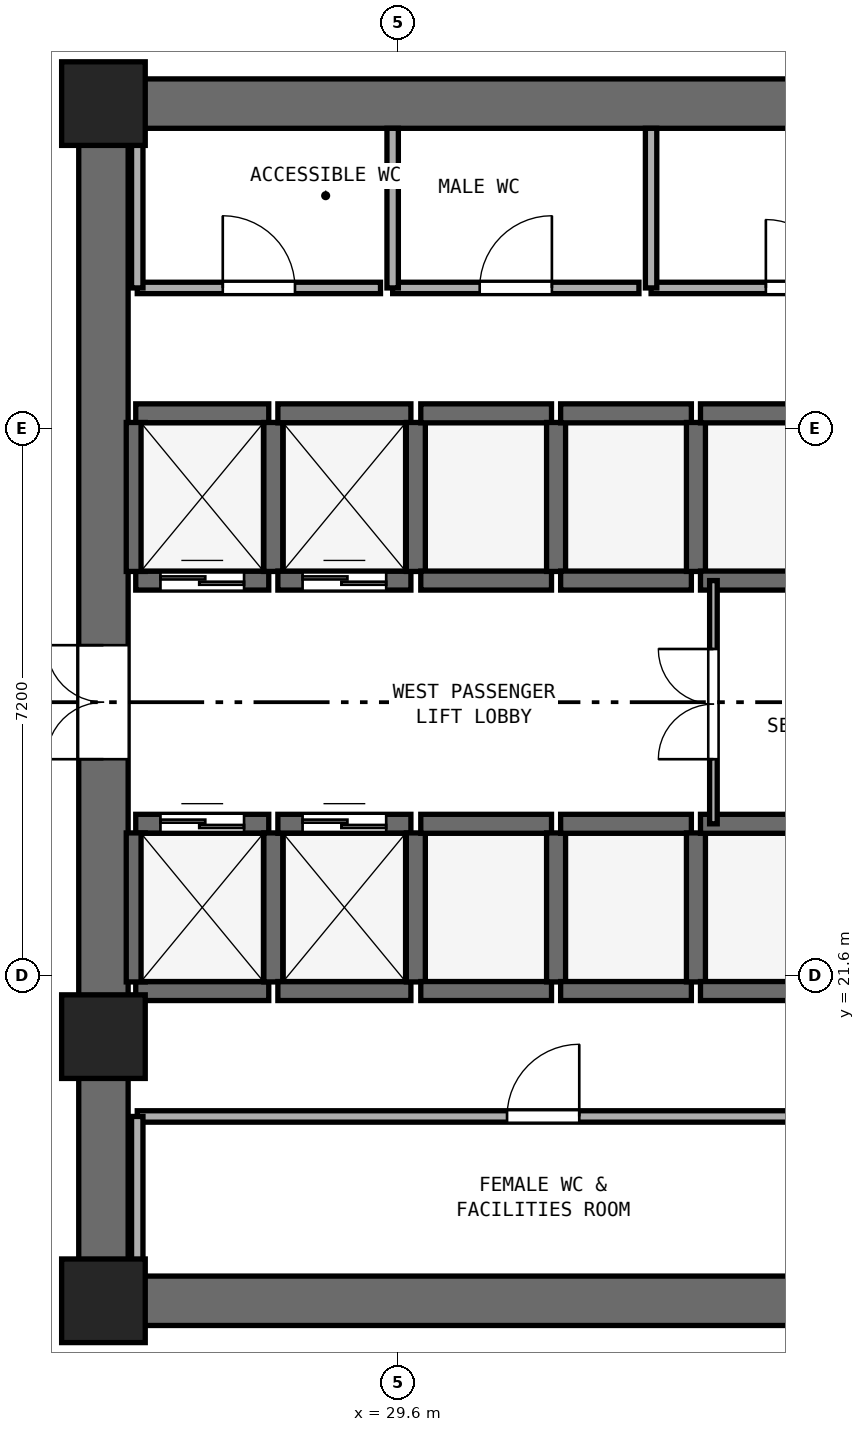
"""IFC4 building model, lengths in metres.
Left out: names, types, materials, properties, quantities, classifications, styles, units other than length and angle.
Written with IfcOpenShell. Run it as: python <this file> out.ifc"""

import sys

from ifc_helpers import new_model, si_unit, direction, frame, frame_2d, origin, origin_2d, place, context, subcontext, project, spatial, rectangle, extrude, element, fill, save


model = new_model("IFC4")
c1 = context("Model", 3, precision=1e-05, world=origin(), true_north=direction((0.0, 1.0)))
c2 = subcontext(c1, "Body", "Model", "MODEL_VIEW")
j1 = project(units=[si_unit("LENGTHUNIT", "METRE"), si_unit("PLANEANGLEUNIT", "RADIAN")], contexts=[c1])
p1 = place(None, origin())
s1 = spatial("IfcSite", under=j1, at=p1, CompositionType="ELEMENT")
p2 = place(p1, origin())
s2 = spatial("IfcBuilding", under=s1, at=p2, CompositionType="ELEMENT")
p3 = place(p2, frame((0.0, 0.0, 63.0)))
s3 = spatial("IfcBuildingStorey", under=s2, at=p3, CompositionType="ELEMENT", Elevation=63.0)
for number, where, z_axis, x_axis in (
    (1, (25.4, 17.325, 0.0), (0.0, 0.0, 1.0), (1.0, 0.0, 0.0)),
    (2, (25.4, 33.075, 0.0), (0.0, 0.0, 1.0), (1.0, 0.0, 0.0)),
):
    element("IfcWall", number, at=place(p3, frame(where, z_axis=z_axis, x_axis=x_axis)), inside=s3, PredefinedType="SHEAR", context=c2, shape_type="SweptSolid", body=[
        extrude(rectangle(XDim=23.2, YDim=0.65, at=frame_2d((11.6, 0.0))), origin(), (0.0, 0.0, 1.0), 3.525),
    ])
p4 = place(p3, frame((25.725, 17.65, 0.0), z_axis=(0.0, 0.0, 1.0), x_axis=(0.0, 1.0, 0.0)))
e3 = element("IfcWall", 3, at=p4, inside=s3, PredefinedType="SHEAR", context=c2, shape_type="SweptSolid", body=[
    extrude(rectangle(XDim=15.1, YDim=0.65, at=frame_2d((7.55, 0.0))), origin(), (0.0, 0.0, 1.0), 3.525),
])
p5 = place(p4, frame((6.8, 0.0, 0.0)))
e4 = element("IfcOpeningElement", 4, at=p5, cuts=e3, PredefinedType="OPENING", context=c2, shape_type="SweptSolid", body=[
    extrude(rectangle(XDim=1.5, YDim=2.15, at=frame_2d((0.75, 1.075))), frame((0.0, 0.335, 0.0), z_axis=(0.0, -1.0, 0.0), x_axis=(1.0, 0.0, 0.0)), (0.0, 0.0, 1.0), 0.67),
])
for number, where, z_axis, x_axis in (
    (5, (25.725, 17.325, 0.0), (0.0, 0.0, 1.0), (1.0, 0.0, 0.0)),
    (6, (25.725, 33.075, 0.0), (0.0, 0.0, 1.0), (1.0, 0.0, 0.0)),
    (7, (25.725, 20.8, 0.0), (0.0, 0.0, 1.0), (1.0, 0.0, 0.0)),
):
    element("IfcColumn", number, at=place(p3, frame(where, z_axis=z_axis, x_axis=x_axis)), inside=s3, PredefinedType="PILASTER", context=c2, shape_type="SweptSolid", body=[
        extrude(rectangle(XDim=1.1, YDim=1.1, at=origin_2d()), origin(), (0.0, 0.0, 1.0), 3.8),
    ])
p6 = place(p3, frame((26.15, 26.8, 0.0), z_axis=(0.0, 0.0, 1.0), x_axis=(1.0, 0.0, 0.0)))
e8 = element("IfcWall", 8, at=p6, inside=s3, PredefinedType="SHEAR", context=c2, shape_type="SweptSolid", body=[
    extrude(rectangle(XDim=1.75, YDim=0.25, at=frame_2d((0.875, 0.0))), origin(), (0.0, 0.0, 1.0), 3.525),
])
p7 = place(p6, frame((0.325, 0.0, 0.0)))
e9 = element("IfcOpeningElement", 9, at=p7, cuts=e8, PredefinedType="OPENING", context=c2, shape_type="SweptSolid", body=[
    extrude(rectangle(XDim=1.1, YDim=2.15, at=frame_2d((0.55, 1.075))), frame((0.0, 0.135, 0.0), z_axis=(0.0, -1.0, 0.0), x_axis=(1.0, 0.0, 0.0)), (0.0, 0.0, 1.0), 0.27),
])
p8 = place(p3, frame((26.15, 29.0, 0.0), z_axis=(0.0, 0.0, 1.0), x_axis=(1.0, 0.0, 0.0)))
e10 = element("IfcWall", 10, at=p8, inside=s3, PredefinedType="SHEAR", context=c2, shape_type="SweptSolid", body=[
    extrude(rectangle(XDim=1.75, YDim=0.25, at=frame_2d((0.875, 0.0))), origin(), (0.0, 0.0, 1.0), 3.525),
])
for number, where, z_axis, x_axis in (
    (11, (26.15, 26.92, 0.0), (0.0, 0.0, 1.0), (0.0, 1.0, 0.0)),
    (12, (27.96, 26.92, 0.0), (0.0, 0.0, 1.0), (0.0, 1.0, 0.0)),
):
    element("IfcWall", number, at=place(p3, frame(where, z_axis=z_axis, x_axis=x_axis)), inside=s3, PredefinedType="SHEAR", context=c2, shape_type="SweptSolid", body=[
        extrude(rectangle(XDim=1.96, YDim=0.25, at=frame_2d((0.98, 0.0))), origin(), (0.0, 0.0, 1.0), 3.525),
    ])
p9 = place(p3, frame((28.02, 26.8, 0.0), z_axis=(0.0, 0.0, 1.0), x_axis=(1.0, 0.0, 0.0)))
e13 = element("IfcWall", 13, at=p9, inside=s3, PredefinedType="SHEAR", context=c2, shape_type="SweptSolid", body=[
    extrude(rectangle(XDim=1.75, YDim=0.25, at=frame_2d((0.875, 0.0))), origin(), (0.0, 0.0, 1.0), 3.525),
])
p10 = place(p9, frame((0.325, 0.0, 0.0)))
e14 = element("IfcOpeningElement", 14, at=p10, cuts=e13, PredefinedType="OPENING", context=c2, shape_type="SweptSolid", body=[
    extrude(rectangle(XDim=1.1, YDim=2.15, at=frame_2d((0.55, 1.075))), frame((0.0, 0.135, 0.0), z_axis=(0.0, -1.0, 0.0), x_axis=(1.0, 0.0, 0.0)), (0.0, 0.0, 1.0), 0.27),
])
p11 = place(p3, frame((28.02, 29.0, 0.0), z_axis=(0.0, 0.0, 1.0), x_axis=(1.0, 0.0, 0.0)))
e15 = element("IfcWall", 15, at=p11, inside=s3, PredefinedType="SHEAR", context=c2, shape_type="SweptSolid", body=[
    extrude(rectangle(XDim=1.75, YDim=0.25, at=frame_2d((0.875, 0.0))), origin(), (0.0, 0.0, 1.0), 3.525),
])
p12 = place(p3, frame((29.835, 26.92, 0.0), z_axis=(0.0, 0.0, 1.0), x_axis=(0.0, 1.0, 0.0)))
e16 = element("IfcWall", 16, at=p12, inside=s3, PredefinedType="SHEAR", context=c2, shape_type="SweptSolid", body=[
    extrude(rectangle(XDim=1.96, YDim=0.25, at=frame_2d((0.98, 0.0))), origin(), (0.0, 0.0, 1.0), 3.525),
])
p13 = place(p3, frame((26.15, 21.4, 0.0), z_axis=(0.0, 0.0, 1.0), x_axis=(1.0, 0.0, 0.0)))
e17 = element("IfcWall", 17, at=p13, inside=s3, PredefinedType="SHEAR", context=c2, shape_type="SweptSolid", body=[
    extrude(rectangle(XDim=1.75, YDim=0.25, at=frame_2d((0.875, 0.0))), origin(), (0.0, 0.0, 1.0), 3.525),
])
p14 = place(p3, frame((26.15, 23.6, 0.0), z_axis=(0.0, 0.0, 1.0), x_axis=(1.0, 0.0, 0.0)))
e18 = element("IfcWall", 18, at=p14, inside=s3, PredefinedType="SHEAR", context=c2, shape_type="SweptSolid", body=[
    extrude(rectangle(XDim=1.75, YDim=0.25, at=frame_2d((0.875, 0.0))), origin(), (0.0, 0.0, 1.0), 3.525),
])
p15 = place(p14, frame((0.325, 0.0, 0.0)))
e19 = element("IfcOpeningElement", 19, at=p15, cuts=e18, PredefinedType="OPENING", context=c2, shape_type="SweptSolid", body=[
    extrude(rectangle(XDim=1.1, YDim=2.15, at=frame_2d((0.55, 1.075))), frame((0.0, 0.135, 0.0), z_axis=(0.0, -1.0, 0.0), x_axis=(1.0, 0.0, 0.0)), (0.0, 0.0, 1.0), 0.27),
])
for number, where, z_axis, x_axis in (
    (20, (26.15, 21.52, 0.0), (0.0, 0.0, 1.0), (0.0, 1.0, 0.0)),
    (21, (27.96, 21.52, 0.0), (0.0, 0.0, 1.0), (0.0, 1.0, 0.0)),
):
    element("IfcWall", number, at=place(p3, frame(where, z_axis=z_axis, x_axis=x_axis)), inside=s3, PredefinedType="SHEAR", context=c2, shape_type="SweptSolid", body=[
        extrude(rectangle(XDim=1.96, YDim=0.25, at=frame_2d((0.98, 0.0))), origin(), (0.0, 0.0, 1.0), 3.525),
    ])
p16 = place(p3, frame((28.02, 21.4, 0.0), z_axis=(0.0, 0.0, 1.0), x_axis=(1.0, 0.0, 0.0)))
e22 = element("IfcWall", 22, at=p16, inside=s3, PredefinedType="SHEAR", context=c2, shape_type="SweptSolid", body=[
    extrude(rectangle(XDim=1.75, YDim=0.25, at=frame_2d((0.875, 0.0))), origin(), (0.0, 0.0, 1.0), 3.525),
])
p17 = place(p3, frame((28.02, 23.6, 0.0), z_axis=(0.0, 0.0, 1.0), x_axis=(1.0, 0.0, 0.0)))
e23 = element("IfcWall", 23, at=p17, inside=s3, PredefinedType="SHEAR", context=c2, shape_type="SweptSolid", body=[
    extrude(rectangle(XDim=1.75, YDim=0.25, at=frame_2d((0.875, 0.0))), origin(), (0.0, 0.0, 1.0), 3.525),
])
p18 = place(p17, frame((0.325, 0.0, 0.0)))
e24 = element("IfcOpeningElement", 24, at=p18, cuts=e23, PredefinedType="OPENING", context=c2, shape_type="SweptSolid", body=[
    extrude(rectangle(XDim=1.1, YDim=2.15, at=frame_2d((0.55, 1.075))), frame((0.0, 0.135, 0.0), z_axis=(0.0, -1.0, 0.0), x_axis=(1.0, 0.0, 0.0)), (0.0, 0.0, 1.0), 0.27),
])
p19 = place(p3, frame((29.835, 21.52, 0.0), z_axis=(0.0, 0.0, 1.0), x_axis=(0.0, 1.0, 0.0)))
e25 = element("IfcWall", 25, at=p19, inside=s3, PredefinedType="SHEAR", context=c2, shape_type="SweptSolid", body=[
    extrude(rectangle(XDim=1.96, YDim=0.25, at=frame_2d((0.98, 0.0))), origin(), (0.0, 0.0, 1.0), 3.525),
])
for number, where, z_axis, x_axis in (
    (26, (29.9, 21.4, 0.0), (0.0, 0.0, 1.0), (1.0, 0.0, 0.0)),
    (27, (29.9, 23.6, 0.0), (0.0, 0.0, 1.0), (1.0, 0.0, 0.0)),
):
    element("IfcWall", number, at=place(p3, frame(where, z_axis=z_axis, x_axis=x_axis)), inside=s3, PredefinedType="SHEAR", context=c2, shape_type="SweptSolid", body=[
        extrude(rectangle(XDim=1.72, YDim=0.25, at=frame_2d((0.86, 0.0))), origin(), (0.0, 0.0, 1.0), 3.525),
    ])
p20 = place(p3, frame((31.68, 21.52, 0.0), z_axis=(0.0, 0.0, 1.0), x_axis=(0.0, 1.0, 0.0)))
e28 = element("IfcWall", 28, at=p20, inside=s3, PredefinedType="SHEAR", context=c2, shape_type="SweptSolid", body=[
    extrude(rectangle(XDim=1.96, YDim=0.25, at=frame_2d((0.98, 0.0))), origin(), (0.0, 0.0, 1.0), 3.525),
])
for number, where, z_axis, x_axis in (
    (29, (31.74, 21.4, 0.0), (0.0, 0.0, 1.0), (1.0, 0.0, 0.0)),
    (30, (31.74, 23.6, 0.0), (0.0, 0.0, 1.0), (1.0, 0.0, 0.0)),
):
    element("IfcWall", number, at=place(p3, frame(where, z_axis=z_axis, x_axis=x_axis)), inside=s3, PredefinedType="SHEAR", context=c2, shape_type="SweptSolid", body=[
        extrude(rectangle(XDim=1.72, YDim=0.25, at=frame_2d((0.86, 0.0))), origin(), (0.0, 0.0, 1.0), 3.525),
    ])
p21 = place(p3, frame((33.52, 21.52, 0.0), z_axis=(0.0, 0.0, 1.0), x_axis=(0.0, 1.0, 0.0)))
e31 = element("IfcWall", 31, at=p21, inside=s3, PredefinedType="SHEAR", context=c2, shape_type="SweptSolid", body=[
    extrude(rectangle(XDim=1.96, YDim=0.25, at=frame_2d((0.98, 0.0))), origin(), (0.0, 0.0, 1.0), 3.525),
])
for number, where, z_axis, x_axis in (
    (32, (33.58, 21.4, 0.0), (0.0, 0.0, 1.0), (1.0, 0.0, 0.0)),
    (33, (33.58, 23.6, 0.0), (0.0, 0.0, 1.0), (1.0, 0.0, 0.0)),
):
    element("IfcWall", number, at=place(p3, frame(where, z_axis=z_axis, x_axis=x_axis)), inside=s3, PredefinedType="SHEAR", context=c2, shape_type="SweptSolid", body=[
        extrude(rectangle(XDim=1.72, YDim=0.25, at=frame_2d((0.86, 0.0))), origin(), (0.0, 0.0, 1.0), 3.525),
    ])
for number, where, z_axis, x_axis in (
    (34, (29.9, 26.8, 0.0), (0.0, 0.0, 1.0), (1.0, 0.0, 0.0)),
    (35, (29.9, 29.0, 0.0), (0.0, 0.0, 1.0), (1.0, 0.0, 0.0)),
):
    element("IfcWall", number, at=place(p3, frame(where, z_axis=z_axis, x_axis=x_axis)), inside=s3, PredefinedType="SHEAR", context=c2, shape_type="SweptSolid", body=[
        extrude(rectangle(XDim=1.72, YDim=0.25, at=frame_2d((0.86, 0.0))), origin(), (0.0, 0.0, 1.0), 3.525),
    ])
p22 = place(p3, frame((31.68, 26.92, 0.0), z_axis=(0.0, 0.0, 1.0), x_axis=(0.0, 1.0, 0.0)))
e36 = element("IfcWall", 36, at=p22, inside=s3, PredefinedType="SHEAR", context=c2, shape_type="SweptSolid", body=[
    extrude(rectangle(XDim=1.96, YDim=0.25, at=frame_2d((0.98, 0.0))), origin(), (0.0, 0.0, 1.0), 3.525),
])
for number, where, z_axis, x_axis in (
    (37, (31.74, 26.8, 0.0), (0.0, 0.0, 1.0), (1.0, 0.0, 0.0)),
    (38, (31.74, 29.0, 0.0), (0.0, 0.0, 1.0), (1.0, 0.0, 0.0)),
):
    element("IfcWall", number, at=place(p3, frame(where, z_axis=z_axis, x_axis=x_axis)), inside=s3, PredefinedType="SHEAR", context=c2, shape_type="SweptSolid", body=[
        extrude(rectangle(XDim=1.72, YDim=0.25, at=frame_2d((0.86, 0.0))), origin(), (0.0, 0.0, 1.0), 3.525),
    ])
p23 = place(p3, frame((33.52, 26.92, 0.0), z_axis=(0.0, 0.0, 1.0), x_axis=(0.0, 1.0, 0.0)))
e39 = element("IfcWall", 39, at=p23, inside=s3, PredefinedType="SHEAR", context=c2, shape_type="SweptSolid", body=[
    extrude(rectangle(XDim=1.96, YDim=0.25, at=frame_2d((0.98, 0.0))), origin(), (0.0, 0.0, 1.0), 3.525),
])
for number, where, z_axis, x_axis in (
    (40, (33.58, 26.8, 0.0), (0.0, 0.0, 1.0), (1.0, 0.0, 0.0)),
    (41, (33.58, 29.0, 0.0), (0.0, 0.0, 1.0), (1.0, 0.0, 0.0)),
):
    element("IfcWall", number, at=place(p3, frame(where, z_axis=z_axis, x_axis=x_axis)), inside=s3, PredefinedType="SHEAR", context=c2, shape_type="SweptSolid", body=[
        extrude(rectangle(XDim=1.72, YDim=0.25, at=frame_2d((0.86, 0.0))), origin(), (0.0, 0.0, 1.0), 3.525),
    ])
p24 = place(p3, frame((26.17, 30.65, 0.0), z_axis=(0.0, 0.0, 1.0), x_axis=(1.0, 0.0, 0.0)))
e42 = element("IfcWall", 42, at=p24, inside=s3, PredefinedType="PARTITIONING", context=c2, shape_type="SweptSolid", body=[
    extrude(rectangle(XDim=3.2, YDim=0.15, at=frame_2d((1.6, 0.0))), origin(), (0.0, 0.0, 1.0), 3.525),
])
p25 = place(p24, frame((1.125, 0.0, 0.0)))
e43 = element("IfcOpeningElement", 43, at=p25, cuts=e42, PredefinedType="OPENING", context=c2, shape_type="SweptSolid", body=[
    extrude(rectangle(XDim=0.95, YDim=2.1, at=frame_2d((0.475, 1.05))), frame((0.0, 0.085, 0.0), z_axis=(0.0, -1.0, 0.0), x_axis=(1.0, 0.0, 0.0)), (0.0, 0.0, 1.0), 0.17),
])
p26 = place(p3, frame((26.17, 30.65, 0.0), z_axis=(0.0, 0.0, 1.0), x_axis=(0.0, 1.0, 0.0)))
e44 = element("IfcWall", 44, at=p26, inside=s3, PredefinedType="PARTITIONING", context=c2, shape_type="SweptSolid", body=[
    extrude(rectangle(XDim=2.1, YDim=0.15, at=frame_2d((1.05, 0.0))), origin(), (0.0, 0.0, 1.0), 3.525),
])
p27 = place(p3, frame((29.53, 30.65, 0.0), z_axis=(0.0, 0.0, 1.0), x_axis=(1.0, 0.0, 0.0)))
e45 = element("IfcWall", 45, at=p27, inside=s3, PredefinedType="PARTITIONING", context=c2, shape_type="SweptSolid", body=[
    extrude(rectangle(XDim=3.24, YDim=0.15, at=frame_2d((1.62, 0.0))), origin(), (0.0, 0.0, 1.0), 3.525),
])
p28 = place(p27, frame((1.145, 0.0, 0.0)))
e46 = element("IfcOpeningElement", 46, at=p28, cuts=e45, PredefinedType="OPENING", context=c2, shape_type="SweptSolid", body=[
    extrude(rectangle(XDim=0.95, YDim=2.1, at=frame_2d((0.475, 1.05))), frame((0.0, 0.085, 0.0), z_axis=(0.0, -1.0, 0.0), x_axis=(1.0, 0.0, 0.0)), (0.0, 0.0, 1.0), 0.17),
])
p29 = place(p3, frame((29.53, 30.65, 0.0), z_axis=(0.0, 0.0, 1.0), x_axis=(0.0, 1.0, 0.0)))
e47 = element("IfcWall", 47, at=p29, inside=s3, PredefinedType="PARTITIONING", context=c2, shape_type="SweptSolid", body=[
    extrude(rectangle(XDim=2.1, YDim=0.15, at=frame_2d((1.05, 0.0))), origin(), (0.0, 0.0, 1.0), 3.525),
])
p30 = place(p3, frame((32.93, 30.65, 0.0), z_axis=(0.0, 0.0, 1.0), x_axis=(1.0, 0.0, 0.0)))
e48 = element("IfcWall", 48, at=p30, inside=s3, PredefinedType="PARTITIONING", context=c2, shape_type="SweptSolid", body=[
    extrude(rectangle(XDim=3.92, YDim=0.15, at=frame_2d((1.96, 0.0))), origin(), (0.0, 0.0, 1.0), 3.525),
])
p31 = place(p30, frame((1.51, 0.0, 0.0)))
e49 = element("IfcOpeningElement", 49, at=p31, cuts=e48, PredefinedType="OPENING", context=c2, shape_type="SweptSolid", body=[
    extrude(rectangle(XDim=0.9, YDim=2.1, at=frame_2d((0.45, 1.05))), frame((0.0, 0.085, 0.0), z_axis=(0.0, -1.0, 0.0), x_axis=(1.0, 0.0, 0.0)), (0.0, 0.0, 1.0), 0.17),
])
p32 = place(p3, frame((32.93, 30.65, 0.0), z_axis=(0.0, 0.0, 1.0), x_axis=(0.0, 1.0, 0.0)))
e50 = element("IfcWall", 50, at=p32, inside=s3, PredefinedType="PARTITIONING", context=c2, shape_type="SweptSolid", body=[
    extrude(rectangle(XDim=2.1, YDim=0.15, at=frame_2d((1.05, 0.0))), origin(), (0.0, 0.0, 1.0), 3.525),
])
p33 = place(p3, frame((26.17, 19.75, 0.0), z_axis=(0.0, 0.0, 1.0), x_axis=(1.0, 0.0, 0.0)))
e51 = element("IfcWall", 51, at=p33, inside=s3, PredefinedType="PARTITIONING", context=c2, shape_type="SweptSolid", body=[
    extrude(rectangle(XDim=10.68, YDim=0.15, at=frame_2d((5.34, 0.0))), origin(), (0.0, 0.0, 1.0), 3.525),
])
p34 = place(p33, frame((4.865, 0.0, 0.0)))
e52 = element("IfcOpeningElement", 52, at=p34, cuts=e51, PredefinedType="OPENING", context=c2, shape_type="SweptSolid", body=[
    extrude(rectangle(XDim=0.95, YDim=2.1, at=frame_2d((0.475, 1.05))), frame((0.0, 0.085, 0.0), z_axis=(0.0, -1.0, 0.0), x_axis=(1.0, 0.0, 0.0)), (0.0, 0.0, 1.0), 0.17),
])
p35 = place(p3, frame((26.17, 17.65, 0.0), z_axis=(0.0, 0.0, 1.0), x_axis=(0.0, 1.0, 0.0)))
e53 = element("IfcWall", 53, at=p35, inside=s3, PredefinedType="PARTITIONING", context=c2, shape_type="SweptSolid", body=[
    extrude(rectangle(XDim=2.1, YDim=0.15, at=frame_2d((1.05, 0.0))), origin(), (0.0, 0.0, 1.0), 3.525),
])
p36 = place(p3, frame((33.75, 23.6, 0.0), z_axis=(0.0, 0.0, 1.0), x_axis=(0.0, 1.0, 0.0)))
e54 = element("IfcWall", 54, at=p36, inside=s3, PredefinedType="PARTITIONING", context=c2, shape_type="SweptSolid", body=[
    extrude(rectangle(XDim=3.2, YDim=0.1, at=frame_2d((1.6, 0.0))), origin(), (0.0, 0.0, 1.0), 3.525),
])
p37 = place(p36, frame((0.85, 0.0, 0.0)))
e55 = element("IfcOpeningElement", 55, at=p37, cuts=e54, PredefinedType="OPENING", context=c2, shape_type="SweptSolid", body=[
    extrude(rectangle(XDim=1.45, YDim=2.12, at=frame_2d((0.725, 1.06))), frame((0.0, 0.06, 0.0), z_axis=(0.0, -1.0, 0.0), x_axis=(1.0, 0.0, 0.0)), (0.0, 0.0, 1.0), 0.12),
])
p38 = place(p7, origin())
e56 = element("IfcDoor", 56, at=p38, inside=s3, OperationType="DOUBLE_DOOR_SLIDING", PredefinedType="DOOR", context=c2, shape_type="SweptSolid", body=[
    extrude(rectangle(XDim=1.1, YDim=2.15, at=frame_2d((0.55, 1.075))), frame((0.0, 0.025, 0.0), z_axis=(0.0, -1.0, 0.0), x_axis=(1.0, 0.0, 0.0)), (0.0, 0.0, 1.0), 0.05),
])
fill(e9, e56)
p39 = place(p10, origin())
e57 = element("IfcDoor", 57, at=p39, inside=s3, OperationType="DOUBLE_DOOR_SLIDING", PredefinedType="DOOR", context=c2, shape_type="SweptSolid", body=[
    extrude(rectangle(XDim=1.1, YDim=2.15, at=frame_2d((0.55, 1.075))), frame((0.0, 0.025, 0.0), z_axis=(0.0, -1.0, 0.0), x_axis=(1.0, 0.0, 0.0)), (0.0, 0.0, 1.0), 0.05),
])
fill(e14, e57)
p40 = place(p15, origin())
e58 = element("IfcDoor", 58, at=p40, inside=s3, OperationType="DOUBLE_DOOR_SLIDING", PredefinedType="DOOR", context=c2, shape_type="SweptSolid", body=[
    extrude(rectangle(XDim=1.1, YDim=2.15, at=frame_2d((0.55, 1.075))), frame((0.0, 0.025, 0.0), z_axis=(0.0, -1.0, 0.0), x_axis=(1.0, 0.0, 0.0)), (0.0, 0.0, 1.0), 0.05),
])
fill(e19, e58)
p41 = place(p18, origin())
e59 = element("IfcDoor", 59, at=p41, inside=s3, OperationType="DOUBLE_DOOR_SLIDING", PredefinedType="DOOR", context=c2, shape_type="SweptSolid", body=[
    extrude(rectangle(XDim=1.1, YDim=2.15, at=frame_2d((0.55, 1.075))), frame((0.0, 0.025, 0.0), z_axis=(0.0, -1.0, 0.0), x_axis=(1.0, 0.0, 0.0)), (0.0, 0.0, 1.0), 0.05),
])
fill(e24, e59)
p42 = place(p5, origin())
e60 = element("IfcDoor", 60, at=p42, inside=s3, OperationType="DOUBLE_DOOR_SINGLE_SWING", PredefinedType="DOOR", context=c2, shape_type="SweptSolid", body=[
    extrude(rectangle(XDim=1.5, YDim=2.15, at=frame_2d((0.75, 1.075))), frame((0.0, 0.025, 0.0), z_axis=(0.0, -1.0, 0.0), x_axis=(1.0, 0.0, 0.0)), (0.0, 0.0, 1.0), 0.05),
])
fill(e4, e60)
p43 = place(p25, origin())
e61 = element("IfcDoor", 61, at=p43, inside=s3, OperationType="SINGLE_SWING_LEFT", PredefinedType="DOOR", context=c2, shape_type="SweptSolid", body=[
    extrude(rectangle(XDim=0.95, YDim=2.1, at=frame_2d((0.475, 1.05))), frame((0.0, 0.025, 0.0), z_axis=(0.0, -1.0, 0.0), x_axis=(1.0, 0.0, 0.0)), (0.0, 0.0, 1.0), 0.05),
])
fill(e43, e61)
p44 = place(p28, origin())
e62 = element("IfcDoor", 62, at=p44, inside=s3, OperationType="SINGLE_SWING_RIGHT", PredefinedType="DOOR", context=c2, shape_type="SweptSolid", body=[
    extrude(rectangle(XDim=0.95, YDim=2.1, at=frame_2d((0.475, 1.05))), frame((0.0, 0.025, 0.0), z_axis=(0.0, -1.0, 0.0), x_axis=(1.0, 0.0, 0.0)), (0.0, 0.0, 1.0), 0.05),
])
fill(e46, e62)
p45 = place(p31, origin())
e63 = element("IfcDoor", 63, at=p45, inside=s3, OperationType="SINGLE_SWING_LEFT", PredefinedType="DOOR", context=c2, shape_type="SweptSolid", body=[
    extrude(rectangle(XDim=0.9, YDim=2.1, at=frame_2d((0.45, 1.05))), frame((0.0, 0.025, 0.0), z_axis=(0.0, -1.0, 0.0), x_axis=(1.0, 0.0, 0.0)), (0.0, 0.0, 1.0), 0.05),
])
fill(e49, e63)
p46 = place(p34, origin())
e64 = element("IfcDoor", 64, at=p46, inside=s3, OperationType="SINGLE_SWING_RIGHT", PredefinedType="DOOR", context=c2, shape_type="SweptSolid", body=[
    extrude(rectangle(XDim=0.95, YDim=2.1, at=frame_2d((0.475, 1.05))), frame((0.0, 0.025, 0.0), z_axis=(0.0, -1.0, 0.0), x_axis=(1.0, 0.0, 0.0)), (0.0, 0.0, 1.0), 0.05),
])
fill(e52, e64)
p47 = place(p37, origin())
e65 = element("IfcDoor", 65, at=p47, inside=s3, OperationType="DOUBLE_DOOR_SINGLE_SWING", PredefinedType="DOOR", context=c2, shape_type="SweptSolid", body=[
    extrude(rectangle(XDim=1.45, YDim=2.12, at=frame_2d((0.725, 1.06))), frame((0.0, 0.025, 0.0), z_axis=(0.0, -1.0, 0.0), x_axis=(1.0, 0.0, 0.0)), (0.0, 0.0, 1.0), 0.05),
])
fill(e55, e65)
save(model, sys.argv[1])
